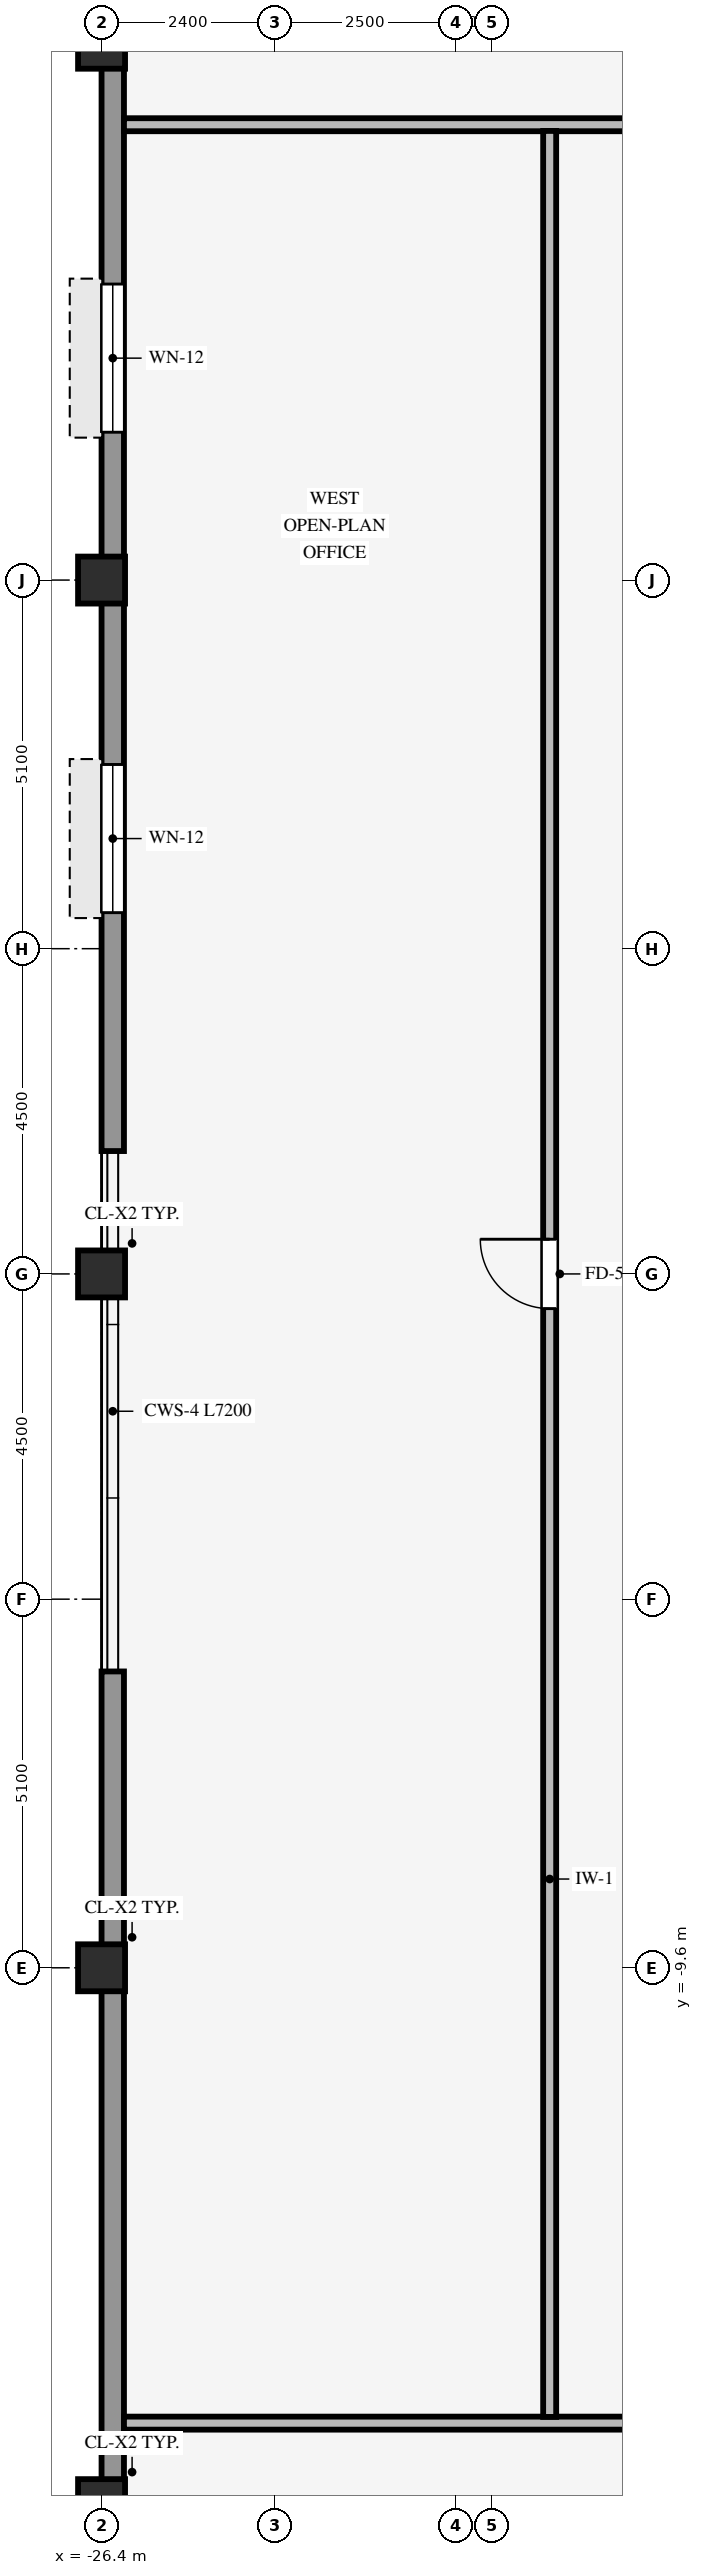
"""IFC4 building model, lengths in metres.
Left out: names, types, materials, properties, quantities, classifications, styles, units other than length and angle.
Written with IfcOpenShell. Run it as: python <this file> out.ifc"""

import sys

from ifc_helpers import new_model, si_unit, direction, frame, frame_2d, origin, origin_2d, place, context, subcontext, project, spatial, rectangle, hollow_rectangle, extrude, source, transform, mapped, element, fill, save


model = new_model("IFC4")
c1 = context("Model", 3, precision=1e-05, world=origin(), true_north=direction((0.0, 1.0)))
c2 = subcontext(c1, "Body", "Model", "MODEL_VIEW")
j1 = project(units=[si_unit("LENGTHUNIT", "METRE"), si_unit("PLANEANGLEUNIT", "RADIAN")], contexts=[c1])
p1 = place(None, origin())
s1 = spatial("IfcSite", under=j1, at=p1, CompositionType="ELEMENT")
p2 = place(p1, origin())
s2 = spatial("IfcBuilding", under=s1, at=p2, CompositionType="ELEMENT")
p3 = place(p2, frame((0.0, 0.0, 167.65)))
s3 = spatial("IfcBuildingStorey", under=s2, at=p3, CompositionType="ELEMENT", Elevation=167.65)
for number, where, z_axis, x_axis in (
    (1, (-26.4, -17.0, 0.0), (0.0, 0.0, 1.0), (1.0, 0.0, 0.0)),
    (2, (-26.4, -9.6, 0.0), (0.0, 0.0, 1.0), (1.0, 0.0, 0.0)),
    (3, (-26.4, 0.0, 0.0), (0.0, 0.0, 1.0), (1.0, 0.0, 0.0)),
    (4, (-26.4, 9.6, 0.0), (0.0, 0.0, 1.0), (1.0, 0.0, 0.0)),
    (5, (-26.4, 17.0, 0.0), (0.0, 0.0, 1.0), (1.0, 0.0, 0.0)),
):
    element("IfcColumn", number, at=place(p3, frame(where, z_axis=z_axis, x_axis=x_axis)), inside=s3, PredefinedType="COLUMN", context=c2, shape_type="SweptSolid", body=[
        extrude(hollow_rectangle(XDim=0.65, YDim=0.65, WallThickness=0.04, InnerFilletRadius=0.04, OuterFilletRadius=0.08, at=origin_2d()), origin(), (0.0, 0.0, 1.0), 3.37),
    ])
p4 = place(p3, frame((-26.245, -20.794, 0.0), z_axis=(0.0, 0.0, 1.0), x_axis=(0.0, 1.0, 0.0)))
e6 = element("IfcWall", 6, at=p4, inside=s3, PredefinedType="STANDARD", context=c2, shape_type="SweptSolid", body=[
    extrude(rectangle(XDim=15.294, YDim=0.31, at=frame_2d((7.647, 0.0))), origin(), (0.0, 0.0, 1.0), 2.705),
])
p5 = place(p3, frame((-26.245, 1.7, 0.0), z_axis=(0.0, 0.0, 1.0), x_axis=(0.0, 1.0, 0.0)))
e7 = element("IfcWall", 7, at=p5, inside=s3, PredefinedType="STANDARD", context=c2, shape_type="SweptSolid", body=[
    extrude(rectangle(XDim=15.294, YDim=0.31, at=frame_2d((7.647, 0.0))), origin(), (0.0, 0.0, 1.0), 2.705),
])
p6 = place(p5, frame((3.299, 0.0, 0.8)))
e8 = element("IfcOpeningElement", 8, at=p6, cuts=e7, PredefinedType="OPENING", context=c2, shape_type="SweptSolid", body=[
    extrude(rectangle(XDim=2.05, YDim=1.52, at=frame_2d((1.025, 0.76))), frame((0.0, 0.165, 0.0), z_axis=(0.0, -1.0, 0.0), x_axis=(1.0, 0.0, 0.0)), (0.0, 0.0, 1.0), 0.33),
])
p7 = place(p5, frame((9.946, 0.0, 0.8)))
e9 = element("IfcOpeningElement", 9, at=p7, cuts=e7, PredefinedType="OPENING", context=c2, shape_type="SweptSolid", body=[
    extrude(rectangle(XDim=2.05, YDim=1.52, at=frame_2d((1.025, 0.76))), frame((0.0, 0.165, 0.0), z_axis=(0.0, -1.0, 0.0), x_axis=(1.0, 0.0, 0.0)), (0.0, 0.0, 1.0), 0.33),
])
p8 = place(p3, frame((-26.09, -15.9, 0.0), z_axis=(0.0, 0.0, 1.0), x_axis=(1.0, 0.0, 0.0)))
e10 = element("IfcWall", 10, at=p8, inside=s3, PredefinedType="PARTITIONING", context=c2, shape_type="SweptSolid", body=[
    extrude(rectangle(XDim=48.38, YDim=0.18, at=frame_2d((24.19, 0.0))), origin(), (0.0, 0.0, 1.0), 3.36),
])
p9 = place(p8, frame((23.31, 0.0, 0.0)))
e11 = element("IfcOpeningElement", 11, at=p9, cuts=e10, PredefinedType="OPENING", context=c2, shape_type="SweptSolid", body=[
    extrude(rectangle(XDim=0.96, YDim=2.1, at=frame_2d((0.48, 1.05))), frame((0.0, 0.1, 0.0), z_axis=(0.0, -1.0, 0.0), x_axis=(1.0, 0.0, 0.0)), (0.0, 0.0, 1.0), 0.2),
])
p10 = place(p8, frame((11.16, 0.0, 0.0)))
e12 = element("IfcOpeningElement", 12, at=p10, cuts=e10, PredefinedType="OPENING", context=c2, shape_type="SweptSolid", body=[
    extrude(rectangle(XDim=0.96, YDim=2.1, at=frame_2d((0.48, 1.05))), frame((0.0, 0.1, 0.0), z_axis=(0.0, -1.0, 0.0), x_axis=(1.0, 0.0, 0.0)), (0.0, 0.0, 1.0), 0.2),
])
p11 = place(p3, frame((-26.09, 15.9, 0.0), z_axis=(0.0, 0.0, 1.0), x_axis=(1.0, 0.0, 0.0)))
e13 = element("IfcWall", 13, at=p11, inside=s3, PredefinedType="PARTITIONING", context=c2, shape_type="SweptSolid", body=[
    extrude(rectangle(XDim=48.38, YDim=0.18, at=frame_2d((24.19, 0.0))), origin(), (0.0, 0.0, 1.0), 3.36),
])
p12 = place(p11, frame((18.12, 0.0, 0.0)))
e14 = element("IfcOpeningElement", 14, at=p12, cuts=e13, PredefinedType="OPENING", context=c2, shape_type="SweptSolid", body=[
    extrude(rectangle(XDim=0.96, YDim=2.1, at=frame_2d((0.48, 1.05))), frame((0.0, 0.1, 0.0), z_axis=(0.0, -1.0, 0.0), x_axis=(1.0, 0.0, 0.0)), (0.0, 0.0, 1.0), 0.2),
])
p13 = place(p11, frame((40.915, 0.0, 0.0)))
e15 = element("IfcOpeningElement", 15, at=p13, cuts=e13, PredefinedType="OPENING", context=c2, shape_type="SweptSolid", body=[
    extrude(rectangle(XDim=0.96, YDim=2.1, at=frame_2d((0.48, 1.05))), frame((0.0, 0.1, 0.0), z_axis=(0.0, -1.0, 0.0), x_axis=(1.0, 0.0, 0.0)), (0.0, 0.0, 1.0), 0.2),
])
p14 = place(p11, frame((28.585, 0.0, 0.0)))
e16 = element("IfcOpeningElement", 16, at=p14, cuts=e13, PredefinedType="OPENING", context=c2, shape_type="SweptSolid", body=[
    extrude(rectangle(XDim=0.96, YDim=2.1, at=frame_2d((0.48, 1.05))), frame((0.0, 0.1, 0.0), z_axis=(0.0, -1.0, 0.0), x_axis=(1.0, 0.0, 0.0)), (0.0, 0.0, 1.0), 0.2),
])
p15 = place(p11, frame((9.595, 0.0, 0.0)))
e17 = element("IfcOpeningElement", 17, at=p15, cuts=e13, PredefinedType="OPENING", context=c2, shape_type="SweptSolid", body=[
    extrude(rectangle(XDim=0.96, YDim=2.1, at=frame_2d((0.48, 1.05))), frame((0.0, 0.1, 0.0), z_axis=(0.0, -1.0, 0.0), x_axis=(1.0, 0.0, 0.0)), (0.0, 0.0, 1.0), 0.2),
])
p16 = place(p3, frame((-20.2, -15.814, 0.0), z_axis=(0.0, 0.0, 1.0), x_axis=(0.0, 1.0, 0.0)))
e18 = element("IfcWall", 18, at=p16, inside=s3, PredefinedType="PARTITIONING", context=c2, shape_type="SweptSolid", body=[
    extrude(rectangle(XDim=31.628, YDim=0.18, at=frame_2d((15.814, 0.0))), origin(), (0.0, 0.0, 1.0), 3.36),
])
p17 = place(p16, frame((15.334, 0.0, 0.0)))
e19 = element("IfcOpeningElement", 19, at=p17, cuts=e18, PredefinedType="OPENING", context=c2, shape_type="SweptSolid", body=[
    extrude(rectangle(XDim=0.96, YDim=2.1, at=frame_2d((0.48, 1.05))), frame((0.0, 0.1, 0.0), z_axis=(0.0, -1.0, 0.0), x_axis=(1.0, 0.0, 0.0)), (0.0, 0.0, 1.0), 0.2),
])
m1 = source(origin(), c2, "Body", "SweptSolid", [
    extrude(rectangle(XDim=2.05, YDim=1.52, at=frame_2d((1.025, 0.76))), frame((0.0, 0.03, 0.0), z_axis=(0.0, -1.0, 0.0), x_axis=(1.0, 0.0, 0.0)), (0.0, 0.0, 1.0), 0.06),
])
p18 = place(p6, origin())
e20 = element("IfcWindow", 20, at=p18, inside=s3, PartitioningType="SINGLE_PANEL", PredefinedType="WINDOW", context=c2, shape_type="MappedRepresentation", body=[
    mapped(m1, transform((0.0, 0.0, 0.0), scale=1.0)),
])
fill(e8, e20)
p19 = place(p7, origin())
e21 = element("IfcWindow", 21, at=p19, inside=s3, PartitioningType="SINGLE_PANEL", PredefinedType="WINDOW", context=c2, shape_type="MappedRepresentation", body=[
    mapped(m1, transform((0.0, 0.0, 0.0), scale=1.0)),
])
fill(e9, e21)
m2 = source(origin(), c2, "Body", "SweptSolid", [
    extrude(rectangle(XDim=0.96, YDim=2.1, at=frame_2d((0.48, 1.05))), frame((0.0, 0.025, 0.0), z_axis=(0.0, -1.0, 0.0), x_axis=(1.0, 0.0, 0.0)), (0.0, 0.0, 1.0), 0.05),
])
p20 = place(p17, origin())
e22 = element("IfcDoor", 22, at=p20, inside=s3, OperationType="SINGLE_SWING_RIGHT", PredefinedType="DOOR", context=c2, shape_type="MappedRepresentation", body=[
    mapped(m2, transform((0.0, 0.0, 0.0), scale=1.0)),
])
fill(e19, e22)
save(model, sys.argv[1])
